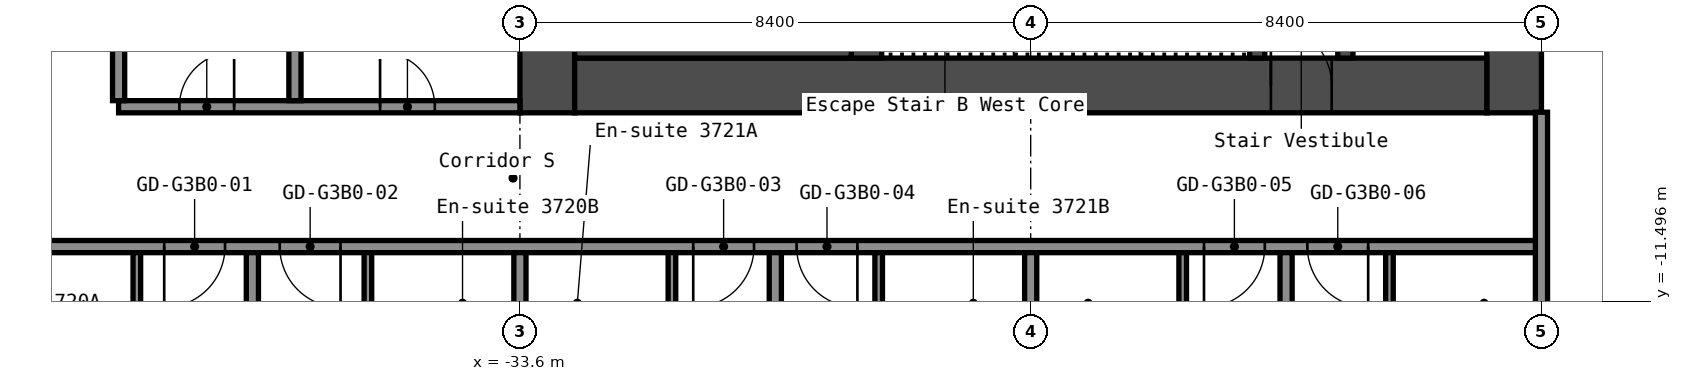
"""IFC4 building model, lengths in metres.
Left out: names, types, materials, properties, quantities, classifications, styles, units other than length and angle.
Written with IfcOpenShell. Run it as: python <this file> out.ifc"""

import sys

from ifc_helpers import new_model, si_unit, direction, frame, frame_2d, origin, place, context, subcontext, project, spatial, rectangle, extrude, element, fill, save


model = new_model("IFC4")
c1 = context("Model", 3, precision=1e-05, world=origin(), true_north=direction((0.0, 1.0)))
c2 = subcontext(c1, "Body", "Model", "MODEL_VIEW")
j1 = project(units=[si_unit("LENGTHUNIT", "METRE"), si_unit("PLANEANGLEUNIT", "RADIAN")], contexts=[c1])
p1 = place(None, origin())
s1 = spatial("IfcSite", under=j1, at=p1, CompositionType="ELEMENT")
p2 = place(p1, origin())
s2 = spatial("IfcBuilding", under=s1, at=p2, CompositionType="ELEMENT")
p3 = place(p2, frame((0.0, 0.0, 134.2)))
s3 = spatial("IfcBuildingStorey", under=s2, at=p3, CompositionType="ELEMENT", Elevation=134.2)
p4 = place(p3, frame((-17.25, -8.4, 0.0), z_axis=(0.0, 0.0, 1.0), x_axis=(0.0, 1.0, 0.0)))
e1 = element("IfcWall", 1, at=p4, inside=s3, PredefinedType="SHEAR", context=c2, shape_type="SweptSolid", body=[
    extrude(rectangle(XDim=16.8, YDim=0.9, at=frame_2d((8.4, 0.0))), origin(), (0.0, 0.0, 1.0), 2.75),
])
p5 = place(p4, frame((7.1, 0.0, 0.0)))
e2 = element("IfcOpeningElement", 2, at=p5, cuts=e1, PredefinedType="OPENING", context=c2, shape_type="SweptSolid", body=[
    extrude(rectangle(XDim=1.6, YDim=2.1, at=frame_2d((0.8, 1.05))), frame((0.0, 0.46, 0.0), z_axis=(0.0, -1.0, 0.0), x_axis=(1.0, 0.0, 0.0)), (0.0, 0.0, 1.0), 0.92),
])
p6 = place(p3, frame((-33.15, -8.4, 0.0), z_axis=(0.0, 0.0, 1.0), x_axis=(0.0, 1.0, 0.0)))
e3 = element("IfcWall", 3, at=p6, inside=s3, PredefinedType="SHEAR", context=c2, shape_type="SweptSolid", body=[
    extrude(rectangle(XDim=16.8, YDim=0.9, at=frame_2d((8.4, 0.0))), origin(), (0.0, 0.0, 1.0), 2.75),
])
p7 = place(p3, frame((-32.7, -7.95, 0.0), z_axis=(0.0, 0.0, 1.0), x_axis=(1.0, 0.0, 0.0)))
e4 = element("IfcWall", 4, at=p7, inside=s3, PredefinedType="SHEAR", context=c2, shape_type="SweptSolid", body=[
    extrude(rectangle(XDim=15.0, YDim=0.9, at=frame_2d((7.5, 0.0))), origin(), (0.0, 0.0, 1.0), 2.75),
])
p8 = place(p7, frame((11.45, 0.0, 0.0)))
e5 = element("IfcOpeningElement", 5, at=p8, cuts=e4, PredefinedType="OPENING", context=c2, shape_type="SweptSolid", body=[
    extrude(rectangle(XDim=1.0, YDim=2.1, at=frame_2d((0.5, 1.05))), frame((0.0, 0.46, 0.0), z_axis=(0.0, -1.0, 0.0), x_axis=(1.0, 0.0, 0.0)), (0.0, 0.0, 1.0), 0.92),
])
p9 = place(p3, frame((-20.025, -7.5, 0.0), z_axis=(0.0, 0.0, 1.0), x_axis=(0.0, 1.0, 0.0)))
e6 = element("IfcWall", 6, at=p9, inside=s3, PredefinedType="SHEAR", context=c2, shape_type="SweptSolid", body=[
    extrude(rectangle(XDim=6.3, YDim=0.25, at=frame_2d((3.15, 0.0))), origin(), (0.0, 0.0, 1.0), 2.75),
])
p10 = place(p9, frame((2.4, 0.0, 0.0)))
e7 = element("IfcOpeningElement", 7, at=p10, cuts=e6, PredefinedType="OPENING", context=c2, shape_type="SweptSolid", body=[
    extrude(rectangle(XDim=1.0, YDim=2.1, at=frame_2d((0.5, 1.05))), frame((0.0, 0.135, 0.0), z_axis=(0.0, -1.0, 0.0), x_axis=(1.0, 0.0, 0.0)), (0.0, 0.0, 1.0), 0.27),
])
p11 = place(p3, frame((-21.475, -7.5, 0.0), z_axis=(0.0, 0.0, 1.0), x_axis=(0.0, 1.0, 0.0)))
e8 = element("IfcWall", 8, at=p11, inside=s3, PredefinedType="SHEAR", context=c2, shape_type="SweptSolid", body=[
    extrude(rectangle(XDim=3.75, YDim=0.25, at=frame_2d((1.875, 0.0))), origin(), (0.0, 0.0, 1.0), 2.75),
])
p12 = place(p11, frame((1.3, 0.0, 0.0)))
e9 = element("IfcOpeningElement", 9, at=p12, cuts=e8, PredefinedType="OPENING", context=c2, shape_type="SweptSolid", body=[
    extrude(rectangle(XDim=1.2, YDim=2.1, at=frame_2d((0.6, 1.05))), frame((0.0, 0.135, 0.0), z_axis=(0.0, -1.0, 0.0), x_axis=(1.0, 0.0, 0.0)), (0.0, 0.0, 1.0), 0.27),
])
p13 = place(p3, frame((-27.9, -7.5, 0.0), z_axis=(0.0, 0.0, 1.0), x_axis=(0.0, 1.0, 0.0)))
e10 = element("IfcWall", 10, at=p13, inside=s3, PredefinedType="SHEAR", context=c2, shape_type="SweptSolid", body=[
    extrude(rectangle(XDim=3.75, YDim=0.5, at=frame_2d((1.875, 0.0))), origin(), (0.0, 0.0, 1.0), 2.75),
])
p14 = place(p3, frame((-32.7, -6.75, 0.0), z_axis=(0.0, 0.0, 1.0), x_axis=(1.0, 0.0, 0.0)))
e11 = element("IfcWall", 11, at=p14, inside=s3, PredefinedType="SHEAR", context=c2, shape_type="SweptSolid", body=[
    extrude(rectangle(XDim=4.55, YDim=1.5, at=frame_2d((2.275, 0.0))), origin(), (0.0, 0.0, 1.0), 2.75),
])
p15 = place(p3, frame((-42.7, -10.6, 0.0), z_axis=(0.0, 0.0, 1.0), x_axis=(1.0, 0.0, 0.0)))
e12 = element("IfcWall", 12, at=p15, inside=s3, PredefinedType="PARTITIONING", context=c2, shape_type="SweptSolid", body=[
    extrude(rectangle(XDim=25.9, YDim=0.2, at=frame_2d((12.95, 0.0))), origin(), (0.0, 0.0, 1.0), 2.75),
])
p16 = place(p15, frame((3.25, 0.0, 0.0)))
e13 = element("IfcOpeningElement", 13, at=p16, cuts=e12, PredefinedType="OPENING", context=c2, shape_type="SweptSolid", body=[
    extrude(rectangle(XDim=1.0, YDim=2.1, at=frame_2d((0.5, 1.05))), frame((0.0, 0.11, 0.0), z_axis=(0.0, -1.0, 0.0), x_axis=(1.0, 0.0, 0.0)), (0.0, 0.0, 1.0), 0.22),
])
p17 = place(p15, frame((5.15, 0.0, 0.0)))
e14 = element("IfcOpeningElement", 14, at=p17, cuts=e12, PredefinedType="OPENING", context=c2, shape_type="SweptSolid", body=[
    extrude(rectangle(XDim=1.0, YDim=2.1, at=frame_2d((0.5, 1.05))), frame((0.0, 0.11, 0.0), z_axis=(0.0, -1.0, 0.0), x_axis=(1.0, 0.0, 0.0)), (0.0, 0.0, 1.0), 0.22),
])
p18 = place(p15, frame((11.95, 0.0, 0.0)))
e15 = element("IfcOpeningElement", 15, at=p18, cuts=e12, PredefinedType="OPENING", context=c2, shape_type="SweptSolid", body=[
    extrude(rectangle(XDim=1.0, YDim=2.1, at=frame_2d((0.5, 1.05))), frame((0.0, 0.11, 0.0), z_axis=(0.0, -1.0, 0.0), x_axis=(1.0, 0.0, 0.0)), (0.0, 0.0, 1.0), 0.22),
])
p19 = place(p15, frame((13.65, 0.0, 0.0)))
e16 = element("IfcOpeningElement", 16, at=p19, cuts=e12, PredefinedType="OPENING", context=c2, shape_type="SweptSolid", body=[
    extrude(rectangle(XDim=1.0, YDim=2.1, at=frame_2d((0.5, 1.05))), frame((0.0, 0.11, 0.0), z_axis=(0.0, -1.0, 0.0), x_axis=(1.0, 0.0, 0.0)), (0.0, 0.0, 1.0), 0.22),
])
p20 = place(p15, frame((20.35, 0.0, 0.0)))
e17 = element("IfcOpeningElement", 17, at=p20, cuts=e12, PredefinedType="OPENING", context=c2, shape_type="SweptSolid", body=[
    extrude(rectangle(XDim=1.0, YDim=2.1, at=frame_2d((0.5, 1.05))), frame((0.0, 0.11, 0.0), z_axis=(0.0, -1.0, 0.0), x_axis=(1.0, 0.0, 0.0)), (0.0, 0.0, 1.0), 0.22),
])
p21 = place(p15, frame((22.05, 0.0, 0.0)))
e18 = element("IfcOpeningElement", 18, at=p21, cuts=e12, PredefinedType="OPENING", context=c2, shape_type="SweptSolid", body=[
    extrude(rectangle(XDim=1.0, YDim=2.1, at=frame_2d((0.5, 1.05))), frame((0.0, 0.11, 0.0), z_axis=(0.0, -1.0, 0.0), x_axis=(1.0, 0.0, 0.0)), (0.0, 0.0, 1.0), 0.22),
])
p22 = place(p3, frame((-40.2, -8.3, 0.0), z_axis=(0.0, 0.0, 1.0), x_axis=(1.0, 0.0, 0.0)))
e19 = element("IfcWall", 19, at=p22, inside=s3, PredefinedType="PARTITIONING", context=c2, shape_type="SweptSolid", body=[
    extrude(rectangle(XDim=6.6, YDim=0.2, at=frame_2d((3.3, 0.0))), origin(), (0.0, 0.0, 1.0), 2.75),
])
p23 = place(p22, frame((1.0, 0.0, 0.0)))
e20 = element("IfcOpeningElement", 20, at=p23, cuts=e19, PredefinedType="OPENING", context=c2, shape_type="SweptSolid", body=[
    extrude(rectangle(XDim=0.9, YDim=2.1, at=frame_2d((0.45, 1.05))), frame((0.0, 0.11, 0.0), z_axis=(0.0, -1.0, 0.0), x_axis=(1.0, 0.0, 0.0)), (0.0, 0.0, 1.0), 0.22),
])
p24 = place(p22, frame((4.3, 0.0, 0.0)))
e21 = element("IfcOpeningElement", 21, at=p24, cuts=e19, PredefinedType="OPENING", context=c2, shape_type="SweptSolid", body=[
    extrude(rectangle(XDim=0.9, YDim=2.1, at=frame_2d((0.45, 1.05))), frame((0.0, 0.11, 0.0), z_axis=(0.0, -1.0, 0.0), x_axis=(1.0, 0.0, 0.0)), (0.0, 0.0, 1.0), 0.22),
])
p25 = place(p3, frame((-40.2, -8.2, 0.0), z_axis=(0.0, 0.0, 1.0), x_axis=(0.0, 1.0, 0.0)))
e22 = element("IfcWall", 22, at=p25, inside=s3, PredefinedType="PARTITIONING", context=c2, shape_type="SweptSolid", body=[
    extrude(rectangle(XDim=16.4, YDim=0.2, at=frame_2d((8.2, 0.0))), origin(), (0.0, 0.0, 1.0), 2.75),
])
p26 = place(p3, frame((-39.9, -13.6, 0.0), z_axis=(0.0, 0.0, 1.0), x_axis=(0.0, 1.0, 0.0)))
e23 = element("IfcWall", 23, at=p26, inside=s3, PredefinedType="PARTITIONING", context=c2, shape_type="SweptSolid", body=[
    extrude(rectangle(XDim=2.9, YDim=0.125, at=frame_2d((1.45, 0.0))), origin(), (0.0, 0.0, 1.0), 2.75),
])
p27 = place(p26, frame((0.6, 0.0, 0.0)))
e24 = element("IfcOpeningElement", 24, at=p27, cuts=e23, PredefinedType="OPENING", context=c2, shape_type="SweptSolid", body=[
    extrude(rectangle(XDim=0.8, YDim=2.1, at=frame_2d((0.4, 1.05))), frame((0.0, 0.073, 0.0), z_axis=(0.0, -1.0, 0.0), x_axis=(1.0, 0.0, 0.0)), (0.0, 0.0, 1.0), 0.145),
])
p28 = place(p3, frame((-38.0, -19.3, 0.0), z_axis=(0.0, 0.0, 1.0), x_axis=(0.0, 1.0, 0.0)))
e25 = element("IfcWall", 25, at=p28, inside=s3, PredefinedType="PARTITIONING", context=c2, shape_type="SweptSolid", body=[
    extrude(rectangle(XDim=8.6, YDim=0.2, at=frame_2d((4.3, 0.0))), origin(), (0.0, 0.0, 1.0), 2.75),
])
p29 = place(p3, frame((-37.3, -8.2, 0.0), z_axis=(0.0, 0.0, 1.0), x_axis=(0.0, 1.0, 0.0)))
e26 = element("IfcWall", 26, at=p29, inside=s3, PredefinedType="PARTITIONING", context=c2, shape_type="SweptSolid", body=[
    extrude(rectangle(XDim=8.2, YDim=0.2, at=frame_2d((4.1, 0.0))), origin(), (0.0, 0.0, 1.0), 2.75),
])
p30 = place(p3, frame((-36.1, -13.6, 0.0), z_axis=(0.0, 0.0, 1.0), x_axis=(0.0, 1.0, 0.0)))
e27 = element("IfcWall", 27, at=p30, inside=s3, PredefinedType="PARTITIONING", context=c2, shape_type="SweptSolid", body=[
    extrude(rectangle(XDim=2.9, YDim=0.125, at=frame_2d((1.45, 0.0))), origin(), (0.0, 0.0, 1.0), 2.75),
])
p31 = place(p30, frame((0.6, 0.0, 0.0)))
e28 = element("IfcOpeningElement", 28, at=p31, cuts=e27, PredefinedType="OPENING", context=c2, shape_type="SweptSolid", body=[
    extrude(rectangle(XDim=0.8, YDim=2.1, at=frame_2d((0.4, 1.05))), frame((0.0, 0.073, 0.0), z_axis=(0.0, -1.0, 0.0), x_axis=(1.0, 0.0, 0.0)), (0.0, 0.0, 1.0), 0.145),
])
p32 = place(p3, frame((-33.6, -19.3, 0.0), z_axis=(0.0, 0.0, 1.0), x_axis=(0.0, 1.0, 0.0)))
e29 = element("IfcWall", 29, at=p32, inside=s3, PredefinedType="PARTITIONING", context=c2, shape_type="SweptSolid", body=[
    extrude(rectangle(XDim=8.6, YDim=0.2, at=frame_2d((4.3, 0.0))), origin(), (0.0, 0.0, 1.0), 2.75),
])
p33 = place(p3, frame((-31.1, -13.6, 0.0), z_axis=(0.0, 0.0, 1.0), x_axis=(0.0, 1.0, 0.0)))
e30 = element("IfcWall", 30, at=p33, inside=s3, PredefinedType="PARTITIONING", context=c2, shape_type="SweptSolid", body=[
    extrude(rectangle(XDim=2.9, YDim=0.125, at=frame_2d((1.45, 0.0))), origin(), (0.0, 0.0, 1.0), 2.75),
])
p34 = place(p33, frame((0.6, 0.0, 0.0)))
e31 = element("IfcOpeningElement", 31, at=p34, cuts=e30, PredefinedType="OPENING", context=c2, shape_type="SweptSolid", body=[
    extrude(rectangle(XDim=0.8, YDim=2.1, at=frame_2d((0.4, 1.05))), frame((0.0, 0.073, 0.0), z_axis=(0.0, -1.0, 0.0), x_axis=(1.0, 0.0, 0.0)), (0.0, 0.0, 1.0), 0.145),
])
p35 = place(p3, frame((-29.4, -19.3, 0.0), z_axis=(0.0, 0.0, 1.0), x_axis=(0.0, 1.0, 0.0)))
e32 = element("IfcWall", 32, at=p35, inside=s3, PredefinedType="PARTITIONING", context=c2, shape_type="SweptSolid", body=[
    extrude(rectangle(XDim=8.6, YDim=0.2, at=frame_2d((4.3, 0.0))), origin(), (0.0, 0.0, 1.0), 2.75),
])
p36 = place(p3, frame((-27.7, -13.6, 0.0), z_axis=(0.0, 0.0, 1.0), x_axis=(0.0, 1.0, 0.0)))
e33 = element("IfcWall", 33, at=p36, inside=s3, PredefinedType="PARTITIONING", context=c2, shape_type="SweptSolid", body=[
    extrude(rectangle(XDim=2.9, YDim=0.125, at=frame_2d((1.45, 0.0))), origin(), (0.0, 0.0, 1.0), 2.75),
])
p37 = place(p36, frame((0.6, 0.0, 0.0)))
e34 = element("IfcOpeningElement", 34, at=p37, cuts=e33, PredefinedType="OPENING", context=c2, shape_type="SweptSolid", body=[
    extrude(rectangle(XDim=0.8, YDim=2.1, at=frame_2d((0.4, 1.05))), frame((0.0, 0.073, 0.0), z_axis=(0.0, -1.0, 0.0), x_axis=(1.0, 0.0, 0.0)), (0.0, 0.0, 1.0), 0.145),
])
p38 = place(p3, frame((-25.2, -19.3, 0.0), z_axis=(0.0, 0.0, 1.0), x_axis=(0.0, 1.0, 0.0)))
e35 = element("IfcWall", 35, at=p38, inside=s3, PredefinedType="PARTITIONING", context=c2, shape_type="SweptSolid", body=[
    extrude(rectangle(XDim=8.6, YDim=0.2, at=frame_2d((4.3, 0.0))), origin(), (0.0, 0.0, 1.0), 2.75),
])
p39 = place(p3, frame((-22.7, -13.6, 0.0), z_axis=(0.0, 0.0, 1.0), x_axis=(0.0, 1.0, 0.0)))
e36 = element("IfcWall", 36, at=p39, inside=s3, PredefinedType="PARTITIONING", context=c2, shape_type="SweptSolid", body=[
    extrude(rectangle(XDim=2.9, YDim=0.125, at=frame_2d((1.45, 0.0))), origin(), (0.0, 0.0, 1.0), 2.75),
])
p40 = place(p39, frame((0.6, 0.0, 0.0)))
e37 = element("IfcOpeningElement", 37, at=p40, cuts=e36, PredefinedType="OPENING", context=c2, shape_type="SweptSolid", body=[
    extrude(rectangle(XDim=0.8, YDim=2.1, at=frame_2d((0.4, 1.05))), frame((0.0, 0.073, 0.0), z_axis=(0.0, -1.0, 0.0), x_axis=(1.0, 0.0, 0.0)), (0.0, 0.0, 1.0), 0.145),
])
p41 = place(p3, frame((-21.0, -19.3, 0.0), z_axis=(0.0, 0.0, 1.0), x_axis=(0.0, 1.0, 0.0)))
e38 = element("IfcWall", 38, at=p41, inside=s3, PredefinedType="PARTITIONING", context=c2, shape_type="SweptSolid", body=[
    extrude(rectangle(XDim=8.6, YDim=0.2, at=frame_2d((4.3, 0.0))), origin(), (0.0, 0.0, 1.0), 2.75),
])
p42 = place(p3, frame((-19.3, -13.6, 0.0), z_axis=(0.0, 0.0, 1.0), x_axis=(0.0, 1.0, 0.0)))
e39 = element("IfcWall", 39, at=p42, inside=s3, PredefinedType="PARTITIONING", context=c2, shape_type="SweptSolid", body=[
    extrude(rectangle(XDim=2.9, YDim=0.125, at=frame_2d((1.45, 0.0))), origin(), (0.0, 0.0, 1.0), 2.75),
])
p43 = place(p42, frame((0.6, 0.0, 0.0)))
e40 = element("IfcOpeningElement", 40, at=p43, cuts=e39, PredefinedType="OPENING", context=c2, shape_type="SweptSolid", body=[
    extrude(rectangle(XDim=0.8, YDim=2.1, at=frame_2d((0.4, 1.05))), frame((0.0, 0.073, 0.0), z_axis=(0.0, -1.0, 0.0), x_axis=(1.0, 0.0, 0.0)), (0.0, 0.0, 1.0), 0.145),
])
p44 = place(p3, frame((-16.8, -19.3, 0.0), z_axis=(0.0, 0.0, 1.0), x_axis=(0.0, 1.0, 0.0)))
e41 = element("IfcWall", 41, at=p44, inside=s3, PredefinedType="PARTITIONING", context=c2, shape_type="SweptSolid", body=[
    extrude(rectangle(XDim=10.91, YDim=0.2, at=frame_2d((5.455, 0.0))), origin(), (0.0, 0.0, 1.0), 2.75),
])
p45 = place(p8, origin())
e42 = element("IfcDoor", 42, at=p45, inside=s3, OperationType="SINGLE_SWING_RIGHT", PredefinedType="DOOR", context=c2, shape_type="SweptSolid", body=[
    extrude(rectangle(XDim=1.0, YDim=2.1, at=frame_2d((0.5, 1.05))), frame((0.0, 0.025, 0.0), z_axis=(0.0, -1.0, 0.0), x_axis=(1.0, 0.0, 0.0)), (0.0, 0.0, 1.0), 0.05),
])
fill(e5, e42)
p46 = place(p16, origin())
e43 = element("IfcDoor", 43, at=p46, inside=s3, OperationType="SINGLE_SWING_LEFT", PredefinedType="DOOR", context=c2, shape_type="SweptSolid", body=[
    extrude(rectangle(XDim=1.0, YDim=2.1, at=frame_2d((0.5, 1.05))), frame((0.0, 0.025, 0.0), z_axis=(0.0, -1.0, 0.0), x_axis=(1.0, 0.0, 0.0)), (0.0, 0.0, 1.0), 0.05),
])
fill(e13, e43)
p47 = place(p17, origin())
e44 = element("IfcDoor", 44, at=p47, inside=s3, OperationType="SINGLE_SWING_RIGHT", PredefinedType="DOOR", context=c2, shape_type="SweptSolid", body=[
    extrude(rectangle(XDim=1.0, YDim=2.1, at=frame_2d((0.5, 1.05))), frame((0.0, 0.025, 0.0), z_axis=(0.0, -1.0, 0.0), x_axis=(1.0, 0.0, 0.0)), (0.0, 0.0, 1.0), 0.05),
])
fill(e14, e44)
p48 = place(p18, origin())
e45 = element("IfcDoor", 45, at=p48, inside=s3, OperationType="SINGLE_SWING_LEFT", PredefinedType="DOOR", context=c2, shape_type="SweptSolid", body=[
    extrude(rectangle(XDim=1.0, YDim=2.1, at=frame_2d((0.5, 1.05))), frame((0.0, 0.025, 0.0), z_axis=(0.0, -1.0, 0.0), x_axis=(1.0, 0.0, 0.0)), (0.0, 0.0, 1.0), 0.05),
])
fill(e15, e45)
p49 = place(p19, origin())
e46 = element("IfcDoor", 46, at=p49, inside=s3, OperationType="SINGLE_SWING_RIGHT", PredefinedType="DOOR", context=c2, shape_type="SweptSolid", body=[
    extrude(rectangle(XDim=1.0, YDim=2.1, at=frame_2d((0.5, 1.05))), frame((0.0, 0.025, 0.0), z_axis=(0.0, -1.0, 0.0), x_axis=(1.0, 0.0, 0.0)), (0.0, 0.0, 1.0), 0.05),
])
fill(e16, e46)
p50 = place(p20, origin())
e47 = element("IfcDoor", 47, at=p50, inside=s3, OperationType="SINGLE_SWING_LEFT", PredefinedType="DOOR", context=c2, shape_type="SweptSolid", body=[
    extrude(rectangle(XDim=1.0, YDim=2.1, at=frame_2d((0.5, 1.05))), frame((0.0, 0.025, 0.0), z_axis=(0.0, -1.0, 0.0), x_axis=(1.0, 0.0, 0.0)), (0.0, 0.0, 1.0), 0.05),
])
fill(e17, e47)
p51 = place(p21, origin())
e48 = element("IfcDoor", 48, at=p51, inside=s3, OperationType="SINGLE_SWING_RIGHT", PredefinedType="DOOR", context=c2, shape_type="SweptSolid", body=[
    extrude(rectangle(XDim=1.0, YDim=2.1, at=frame_2d((0.5, 1.05))), frame((0.0, 0.025, 0.0), z_axis=(0.0, -1.0, 0.0), x_axis=(1.0, 0.0, 0.0)), (0.0, 0.0, 1.0), 0.05),
])
fill(e18, e48)
p52 = place(p23, origin())
e49 = element("IfcDoor", 49, at=p52, inside=s3, OperationType="SINGLE_SWING_LEFT", PredefinedType="DOOR", context=c2, shape_type="SweptSolid", body=[
    extrude(rectangle(XDim=0.9, YDim=2.1, at=frame_2d((0.45, 1.05))), frame((0.0, 0.025, 0.0), z_axis=(0.0, -1.0, 0.0), x_axis=(1.0, 0.0, 0.0)), (0.0, 0.0, 1.0), 0.05),
])
fill(e20, e49)
p53 = place(p24, origin())
e50 = element("IfcDoor", 50, at=p53, inside=s3, OperationType="SINGLE_SWING_RIGHT", PredefinedType="DOOR", context=c2, shape_type="SweptSolid", body=[
    extrude(rectangle(XDim=0.9, YDim=2.1, at=frame_2d((0.45, 1.05))), frame((0.0, 0.025, 0.0), z_axis=(0.0, -1.0, 0.0), x_axis=(1.0, 0.0, 0.0)), (0.0, 0.0, 1.0), 0.05),
])
fill(e21, e50)
save(model, sys.argv[1])
